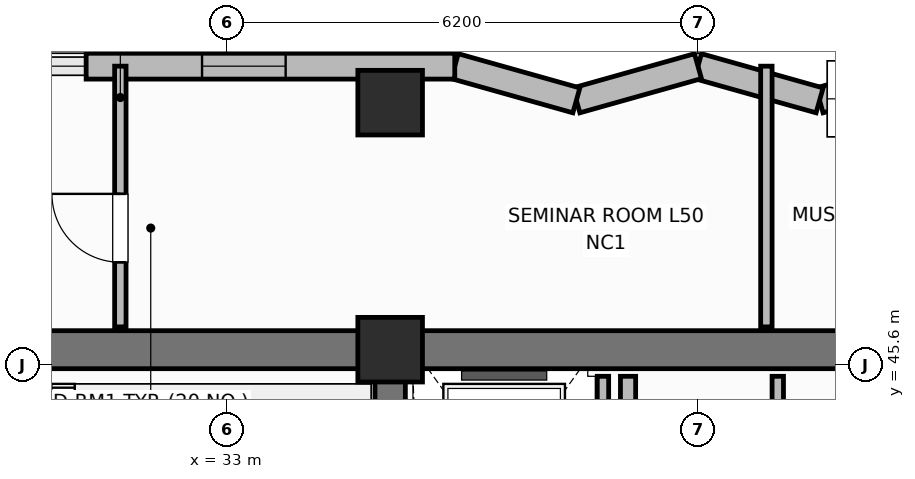
"""IFC4 building model, lengths in metres.
Left out: names, types, materials, properties, quantities, classifications, styles, units other than length and angle.
Written with IfcOpenShell. Run it as: python <this file> out.ifc"""

import sys

from ifc_helpers import new_model, si_unit, direction, frame, frame_2d, origin, origin_2d, place, context, subcontext, project, spatial, rectangle, extrude, element, fill, save


model = new_model("IFC4")
c1 = context("Model", 3, precision=1e-05, world=origin(), true_north=direction((0.0, 1.0)))
c2 = subcontext(c1, "Body", "Model", "MODEL_VIEW")
j1 = project(units=[si_unit("LENGTHUNIT", "METRE"), si_unit("PLANEANGLEUNIT", "RADIAN")], contexts=[c1])
p1 = place(None, origin())
s1 = spatial("IfcSite", under=j1, at=p1, CompositionType="ELEMENT")
p2 = place(p1, origin())
s2 = spatial("IfcBuilding", under=s1, at=p2, CompositionType="ELEMENT")
p3 = place(p2, frame((0.0, 0.0, 203.1)))
s3 = spatial("IfcBuildingStorey", under=s2, at=p3, CompositionType="ELEMENT", Elevation=203.1)
p4 = place(p3, frame((25.6, 45.8, 0.0), z_axis=(0.0, 0.0, 1.0), x_axis=(1.0, 0.0, 0.0)))
e1 = element("IfcWall", 1, at=p4, inside=s3, PredefinedType="SHEAR", context=c2, shape_type="SweptSolid", body=[
    extrude(rectangle(XDim=27.2, YDim=0.5, at=frame_2d((13.6, 0.0))), origin(), (0.0, 0.0, 1.0), 4.2),
])
p5 = place(p3, frame((35.15, 39.85, 0.0), z_axis=(0.0, 0.0, 1.0), x_axis=(0.0, 1.0, 0.0)))
e2 = element("IfcWall", 2, at=p5, inside=s3, PredefinedType="SHEAR", context=c2, shape_type="SweptSolid", body=[
    extrude(rectangle(XDim=5.7, YDim=0.4, at=frame_2d((2.85, 0.0))), origin(), (0.0, 0.0, 1.0), 4.2),
])
for number, where, z_axis, x_axis in (
    (3, (35.15, 45.8, 0.0), (0.0, 0.0, 1.0), (1.0, 0.0, 0.0)),
    (4, (35.15, 49.05, 0.0), (0.0, 0.0, 1.0), (1.0, 0.0, 0.0)),
):
    element("IfcColumn", number, at=place(p3, frame(where, z_axis=z_axis, x_axis=x_axis)), inside=s3, PredefinedType="COLUMN", context=c2, shape_type="SweptSolid", body=[
        extrude(rectangle(XDim=0.85, YDim=0.85, at=origin_2d()), origin(), (0.0, 0.0, 1.0), 4.2),
    ])
p6 = place(p3, frame((42.4, 49.53, 0.0), z_axis=(0.0, 0.0, 1.0), x_axis=(-0.962652136636, -0.270741322725, 0.0)))
e5 = element("IfcWall", 5, at=p6, inside=s3, PredefinedType="SOLIDWALL", context=c2, shape_type="SweptSolid", body=[
    extrude(rectangle(XDim=1.662, YDim=0.34, at=frame_2d((0.831, 0.0))), origin(), (0.0, 0.0, 1.0), 3.22),
])
p7 = place(p3, frame((40.8, 49.08, 0.0), z_axis=(0.0, 0.0, 1.0), x_axis=(-0.962662902433, 0.270703040766, 0.0)))
e6 = element("IfcWall", 6, at=p7, inside=s3, PredefinedType="SOLIDWALL", context=c2, shape_type="SweptSolid", body=[
    extrude(rectangle(XDim=1.662, YDim=0.34, at=frame_2d((0.831, 0.0))), origin(), (0.0, 0.0, 1.0), 3.22),
])
p8 = place(p3, frame((39.2, 49.53, 0.0), z_axis=(0.0, 0.0, 1.0), x_axis=(-0.962652136636, -0.270741322725, 0.0)))
e7 = element("IfcWall", 7, at=p8, inside=s3, PredefinedType="SOLIDWALL", context=c2, shape_type="SweptSolid", body=[
    extrude(rectangle(XDim=1.662, YDim=0.34, at=frame_2d((0.831, 0.0))), origin(), (0.0, 0.0, 1.0), 3.22),
])
p9 = place(p3, frame((37.6, 49.08, 0.0), z_axis=(0.0, 0.0, 1.0), x_axis=(-0.962662902433, 0.270703040766, 0.0)))
e8 = element("IfcWall", 8, at=p9, inside=s3, PredefinedType="SOLIDWALL", context=c2, shape_type="SweptSolid", body=[
    extrude(rectangle(XDim=1.662, YDim=0.34, at=frame_2d((0.831, 0.0))), origin(), (0.0, 0.0, 1.0), 3.22),
])
p10 = place(p3, frame((36.0, 49.53, 0.0), z_axis=(0.0, 0.0, 1.0), x_axis=(-1.0, 0.0, 0.0)))
e9 = element("IfcWall", 9, at=p10, inside=s3, PredefinedType="SOLIDWALL", context=c2, shape_type="SweptSolid", body=[
    extrude(rectangle(XDim=4.85, YDim=0.34, at=frame_2d((2.425, 0.0))), origin(), (0.0, 0.0, 1.0), 3.22),
])
p11 = place(p10, frame((2.225, 0.0, 0.95)))
e10 = element("IfcOpeningElement", 10, at=p11, cuts=e9, PredefinedType="OPENING", context=c2, shape_type="SweptSolid", body=[
    extrude(rectangle(XDim=1.1, YDim=1.65, at=frame_2d((0.55, 0.825))), frame((0.0, 0.18, 0.0), z_axis=(0.0, -1.0, 0.0), x_axis=(1.0, 0.0, 0.0)), (0.0, 0.0, 1.0), 0.36),
])
p12 = place(p3, frame((37.95, 42.6, 0.0), z_axis=(0.0, 0.0, 1.0), x_axis=(0.0, 1.0, 0.0)))
e11 = element("IfcWall", 11, at=p12, inside=s3, PredefinedType="PARTITIONING", context=c2, shape_type="SweptSolid", body=[
    extrude(rectangle(XDim=2.85, YDim=0.15, at=frame_2d((1.425, 0.0))), origin(), (0.0, 0.0, 1.0), 3.05),
])
p13 = place(p3, frame((38.28, 39.82, 0.0), z_axis=(0.0, 0.0, 1.0), x_axis=(0.0, 1.0, 0.0)))
e12 = element("IfcWall", 12, at=p13, inside=s3, PredefinedType="PARTITIONING", context=c2, shape_type="SweptSolid", body=[
    extrude(rectangle(XDim=5.63, YDim=0.2, at=frame_2d((2.815, 0.0))), origin(), (0.0, 0.0, 1.0), 3.05),
])
p14 = place(p3, frame((40.25, 39.82, 0.0), z_axis=(0.0, 0.0, 1.0), x_axis=(0.0, 1.0, 0.0)))
e13 = element("IfcWall", 13, at=p14, inside=s3, PredefinedType="PARTITIONING", context=c2, shape_type="SweptSolid", body=[
    extrude(rectangle(XDim=5.63, YDim=0.15, at=frame_2d((2.815, 0.0))), origin(), (0.0, 0.0, 1.0), 3.05),
])
p15 = place(p3, frame((31.6, 46.1, 0.0), z_axis=(0.0, 0.0, 1.0), x_axis=(0.0, 1.0, 0.0)))
e14 = element("IfcWall", 14, at=p15, inside=s3, PredefinedType="PARTITIONING", context=c2, shape_type="SweptSolid", body=[
    extrude(rectangle(XDim=3.43, YDim=0.15, at=frame_2d((1.715, 0.0))), origin(), (0.0, 0.0, 1.0), 3.05),
])
p16 = place(p15, frame((0.85, 0.0, 0.0)))
e15 = element("IfcOpeningElement", 15, at=p16, cuts=e14, PredefinedType="OPENING", context=c2, shape_type="SweptSolid", body=[
    extrude(rectangle(XDim=0.9, YDim=2.1, at=frame_2d((0.45, 1.05))), frame((0.0, 0.085, 0.0), z_axis=(0.0, -1.0, 0.0), x_axis=(1.0, 0.0, 0.0)), (0.0, 0.0, 1.0), 0.17),
])
p17 = place(p3, frame((40.1, 46.1, 0.0), z_axis=(0.0, 0.0, 1.0), x_axis=(0.0, 1.0, 0.0)))
e16 = element("IfcWall", 16, at=p17, inside=s3, PredefinedType="PARTITIONING", context=c2, shape_type="SweptSolid", body=[
    extrude(rectangle(XDim=3.43, YDim=0.15, at=frame_2d((1.715, 0.0))), origin(), (0.0, 0.0, 1.0), 3.05),
])
p18 = place(p11, origin())
e17 = element("IfcWindow", 17, at=p18, inside=s3, PartitioningType="SINGLE_PANEL", PredefinedType="WINDOW", context=c2, shape_type="SweptSolid", body=[
    extrude(rectangle(XDim=1.1, YDim=1.65, at=frame_2d((0.55, 0.825))), frame((0.0, 0.03, 0.0), z_axis=(0.0, -1.0, 0.0), x_axis=(1.0, 0.0, 0.0)), (0.0, 0.0, 1.0), 0.06),
])
fill(e10, e17)
p19 = place(p16, origin())
e18 = element("IfcDoor", 18, at=p19, inside=s3, OperationType="SINGLE_SWING_RIGHT", PredefinedType="DOOR", context=c2, shape_type="SweptSolid", body=[
    extrude(rectangle(XDim=0.9, YDim=2.1, at=frame_2d((0.45, 1.05))), frame((0.0, 0.025, 0.0), z_axis=(0.0, -1.0, 0.0), x_axis=(1.0, 0.0, 0.0)), (0.0, 0.0, 1.0), 0.05),
])
fill(e15, e18)
save(model, sys.argv[1])
